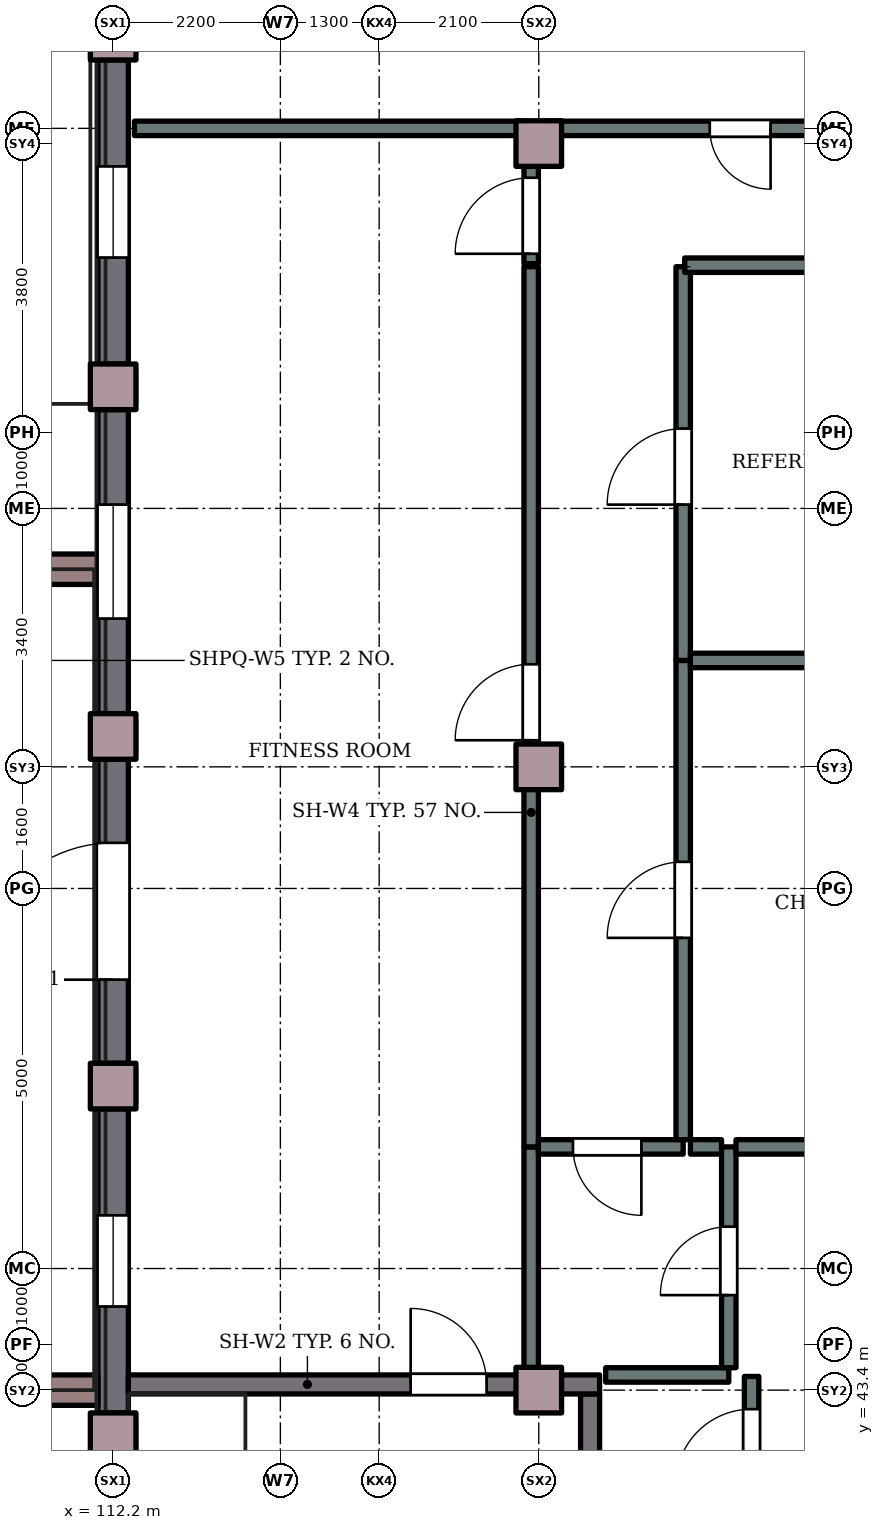
"""IFC4 building model, lengths in metres.
Left out: names, types, materials, properties, quantities, classifications, styles, units other than length and angle.
Written with IfcOpenShell. Run it as: python <this file> out.ifc"""

import sys

from ifc_helpers import new_model, si_unit, direction, frame, frame_2d, origin, origin_2d, place, context, subcontext, project, spatial, rectangle, extrude, element, fill, save


model = new_model("IFC4")
c1 = context("Model", 3, precision=1e-05, world=origin(), true_north=direction((0.0, 1.0)))
c2 = subcontext(c1, "Body", "Model", "MODEL_VIEW")
j1 = project(units=[si_unit("LENGTHUNIT", "METRE"), si_unit("PLANEANGLEUNIT", "RADIAN")], contexts=[c1])
p1 = place(None, origin())
s1 = spatial("IfcSite", under=j1, at=p1, CompositionType="ELEMENT")
p2 = place(p1, origin())
s2 = spatial("IfcBuilding", under=s1, at=p2, CompositionType="ELEMENT")
p3 = place(p2, origin())
s3 = spatial("IfcBuildingStorey", under=s2, at=p3, CompositionType="ELEMENT", Elevation=0.0)
for number, where, z_axis, x_axis in (
    (1, (112.2, 42.8, 0.0), (0.0, 0.0, 1.0), (1.0, 0.0, 0.0)),
    (2, (112.2, 47.4, 0.0), (0.0, 0.0, 1.0), (1.0, 0.0, 0.0)),
    (3, (112.2, 52.0, 0.0), (0.0, 0.0, 1.0), (1.0, 0.0, 0.0)),
    (4, (112.2, 56.6, 0.0), (0.0, 0.0, 1.0), (1.0, 0.0, 0.0)),
    (5, (112.2, 61.2, 0.0), (0.0, 0.0, 1.0), (1.0, 0.0, 0.0)),
    (6, (117.8, 51.6, 0.0), (0.0, 0.0, 1.0), (1.0, 0.0, 0.0)),
    (7, (117.8, 59.8, 0.0), (0.0, 0.0, 1.0), (1.0, 0.0, 0.0)),
    (8, (117.8, 43.4, 0.0), (0.0, 0.0, 1.0), (1.0, 0.0, 0.0)),
):
    element("IfcColumn", number, at=place(p3, frame(where, z_axis=z_axis, x_axis=x_axis)), inside=s3, PredefinedType="COLUMN", context=c2, shape_type="SweptSolid", body=[
        extrude(rectangle(XDim=0.6, YDim=0.6, at=origin_2d()), origin(), (0.0, 0.0, 1.0), 4.2),
    ])
p4 = place(p3, frame((112.2, 43.1, 0.0), z_axis=(0.0, 0.0, 1.0), x_axis=(0.0, 1.0, 0.0)))
e9 = element("IfcWall", 9, at=p4, inside=s3, PredefinedType="SOLIDWALL", context=c2, shape_type="SweptSolid", body=[
    extrude(rectangle(XDim=4.0, YDim=0.4, at=frame_2d((2.0, 0.0))), origin(), (0.0, 0.0, 1.0), 4.2),
])
p5 = place(p4, frame((1.4, 0.0, 1.2)))
e10 = element("IfcOpeningElement", 10, at=p5, cuts=e9, PredefinedType="OPENING", context=c2, shape_type="SweptSolid", body=[
    extrude(rectangle(XDim=1.2, YDim=1.8, at=frame_2d((0.6, 0.9))), frame((0.0, 0.21, 0.0), z_axis=(0.0, -1.0, 0.0), x_axis=(1.0, 0.0, 0.0)), (0.0, 0.0, 1.0), 0.42),
])
p6 = place(p3, frame((112.2, 47.7, 0.0), z_axis=(0.0, 0.0, 1.0), x_axis=(0.0, 1.0, 0.0)))
e11 = element("IfcWall", 11, at=p6, inside=s3, PredefinedType="SOLIDWALL", context=c2, shape_type="SweptSolid", body=[
    extrude(rectangle(XDim=4.0, YDim=0.4, at=frame_2d((2.0, 0.0))), origin(), (0.0, 0.0, 1.0), 4.2),
])
p7 = place(p6, frame((1.1, 0.0, 0.0)))
e12 = element("IfcOpeningElement", 12, at=p7, cuts=e11, PredefinedType="OPENING", context=c2, shape_type="SweptSolid", body=[
    extrude(rectangle(XDim=1.8, YDim=2.1, at=frame_2d((0.9, 1.05))), frame((0.0, 0.21, 0.0), z_axis=(0.0, -1.0, 0.0), x_axis=(1.0, 0.0, 0.0)), (0.0, 0.0, 1.0), 0.42),
])
p8 = place(p3, frame((112.2, 52.3, 0.0), z_axis=(0.0, 0.0, 1.0), x_axis=(0.0, 1.0, 0.0)))
e13 = element("IfcWall", 13, at=p8, inside=s3, PredefinedType="SOLIDWALL", context=c2, shape_type="SweptSolid", body=[
    extrude(rectangle(XDim=4.0, YDim=0.4, at=frame_2d((2.0, 0.0))), origin(), (0.0, 0.0, 1.0), 4.2),
])
p9 = place(p8, frame((1.25, 0.0, 0.9)))
e14 = element("IfcOpeningElement", 14, at=p9, cuts=e13, PredefinedType="OPENING", context=c2, shape_type="SweptSolid", body=[
    extrude(rectangle(XDim=1.5, YDim=2.0, at=frame_2d((0.75, 1.0))), frame((0.0, 0.21, 0.0), z_axis=(0.0, -1.0, 0.0), x_axis=(1.0, 0.0, 0.0)), (0.0, 0.0, 1.0), 0.42),
])
p10 = place(p3, frame((112.2, 56.9, 0.0), z_axis=(0.0, 0.0, 1.0), x_axis=(0.0, 1.0, 0.0)))
e15 = element("IfcWall", 15, at=p10, inside=s3, PredefinedType="SOLIDWALL", context=c2, shape_type="SweptSolid", body=[
    extrude(rectangle(XDim=4.0, YDim=0.4, at=frame_2d((2.0, 0.0))), origin(), (0.0, 0.0, 1.0), 4.2),
])
p11 = place(p10, frame((1.4, 0.0, 1.2)))
e16 = element("IfcOpeningElement", 16, at=p11, cuts=e15, PredefinedType="OPENING", context=c2, shape_type="SweptSolid", body=[
    extrude(rectangle(XDim=1.2, YDim=1.8, at=frame_2d((0.6, 0.9))), frame((0.0, 0.21, 0.0), z_axis=(0.0, -1.0, 0.0), x_axis=(1.0, 0.0, 0.0)), (0.0, 0.0, 1.0), 0.42),
])
p12 = place(p3, frame((118.475, 38.4, 0.0), z_axis=(0.0, 0.0, 1.0), x_axis=(0.0, 1.0, 0.0)))
e17 = element("IfcWall", 17, at=p12, inside=s3, PredefinedType="SHEAR", context=c2, shape_type="SweptSolid", body=[
    extrude(rectangle(XDim=4.95, YDim=0.25, at=frame_2d((2.475, 0.0))), origin(), (0.0, 0.0, 1.0), 4.2),
])
p13 = place(p3, frame((112.4, 43.475, 0.0), z_axis=(0.0, 0.0, 1.0), x_axis=(1.0, 0.0, 0.0)))
e18 = element("IfcWall", 18, at=p13, inside=s3, PredefinedType="SHEAR", context=c2, shape_type="SweptSolid", body=[
    extrude(rectangle(XDim=6.2, YDim=0.25, at=frame_2d((3.1, 0.0))), origin(), (0.0, 0.0, 1.0), 4.2),
])
p14 = place(p13, frame((3.714, 0.0, 0.0)))
e19 = element("IfcOpeningElement", 19, at=p14, cuts=e18, PredefinedType="OPENING", context=c2, shape_type="SweptSolid", body=[
    extrude(rectangle(XDim=1.0, YDim=2.1, at=frame_2d((0.5, 1.05))), frame((0.0, 0.135, 0.0), z_axis=(0.0, -1.0, 0.0), x_axis=(1.0, 0.0, 0.0)), (0.0, 0.0, 1.0), 0.27),
])
for number, where, z_axis, x_axis in (
    (20, (110.3, 43.4, 0.0), (0.0, 0.0, 1.0), (1.0, 0.0, 0.0)),
    (21, (110.3, 54.2, 0.0), (0.0, 0.0, 1.0), (1.0, 0.0, 0.0)),
):
    element("IfcWall", number, at=place(p3, frame(where, z_axis=z_axis, x_axis=x_axis)), inside=s3, PredefinedType="STANDARD", context=c2, shape_type="SweptSolid", body=[
        extrude(rectangle(XDim=1.7, YDim=0.4, at=frame_2d((0.85, 0.0))), origin(), (0.0, 0.0, 1.0), 4.2),
    ])
p15 = place(p3, frame((112.4, 43.02, 0.0), z_axis=(0.0, 0.0, 1.0), x_axis=(0.0, -1.0, 0.0)))
e22 = element("IfcWall", 22, at=p15, inside=s3, PredefinedType="PARTITIONING", context=c2, shape_type="SweptSolid", body=[
    extrude(rectangle(XDim=0.44, YDim=0.19, at=frame_2d((0.22, 0.0))), origin(), (0.0, 0.0, 1.0), 3.9),
])
p16 = place(p3, frame((112.4, 47.62, 0.0), z_axis=(0.0, 0.0, 1.0), x_axis=(0.0, -1.0, 0.0)))
e23 = element("IfcWall", 23, at=p16, inside=s3, PredefinedType="PARTITIONING", context=c2, shape_type="SweptSolid", body=[
    extrude(rectangle(XDim=0.44, YDim=0.19, at=frame_2d((0.22, 0.0))), origin(), (0.0, 0.0, 1.0), 3.9),
])
p17 = place(p3, frame((112.4, 52.22, 0.0), z_axis=(0.0, 0.0, 1.0), x_axis=(0.0, -1.0, 0.0)))
e24 = element("IfcWall", 24, at=p17, inside=s3, PredefinedType="PARTITIONING", context=c2, shape_type="SweptSolid", body=[
    extrude(rectangle(XDim=0.44, YDim=0.19, at=frame_2d((0.22, 0.0))), origin(), (0.0, 0.0, 1.0), 3.9),
])
p18 = place(p3, frame((112.4, 56.82, 0.0), z_axis=(0.0, 0.0, 1.0), x_axis=(0.0, -1.0, 0.0)))
e25 = element("IfcWall", 25, at=p18, inside=s3, PredefinedType="PARTITIONING", context=c2, shape_type="SweptSolid", body=[
    extrude(rectangle(XDim=0.44, YDim=0.19, at=frame_2d((0.22, 0.0))), origin(), (0.0, 0.0, 1.0), 3.9),
])
p19 = place(p3, frame((112.4, 61.42, 0.0), z_axis=(0.0, 0.0, 1.0), x_axis=(0.0, -1.0, 0.0)))
e26 = element("IfcWall", 26, at=p19, inside=s3, PredefinedType="PARTITIONING", context=c2, shape_type="SweptSolid", body=[
    extrude(rectangle(XDim=0.44, YDim=0.19, at=frame_2d((0.22, 0.0))), origin(), (0.0, 0.0, 1.0), 3.9),
])
p20 = place(p3, frame((117.605, 60.0, 0.0), z_axis=(0.0, 0.0, 1.0), x_axis=(-1.0, 0.0, 0.0)))
e27 = element("IfcWall", 27, at=p20, inside=s3, PredefinedType="PARTITIONING", context=c2, shape_type="SweptSolid", body=[
    extrude(rectangle(XDim=5.125, YDim=0.19, at=frame_2d((2.562, 0.0))), origin(), (0.0, 0.0, 1.0), 3.9),
])
p21 = place(p3, frame((117.7, 43.68, 0.0), z_axis=(0.0, 0.0, 1.0), x_axis=(0.0, 1.0, 0.0)))
e28 = element("IfcWall", 28, at=p21, inside=s3, PredefinedType="PARTITIONING", context=c2, shape_type="SweptSolid", body=[
    extrude(rectangle(XDim=2.92, YDim=0.19, at=frame_2d((1.46, 0.0))), origin(), (0.0, 0.0, 1.0), 3.9),
])
p22 = place(p3, frame((117.7, 46.6, 0.0), z_axis=(0.0, 0.0, 1.0), x_axis=(0.0, 1.0, 0.0)))
e29 = element("IfcWall", 29, at=p22, inside=s3, PredefinedType="PARTITIONING", context=c2, shape_type="SweptSolid", body=[
    extrude(rectangle(XDim=11.58, YDim=0.19, at=frame_2d((5.79, 0.0))), origin(), (0.0, 0.0, 1.0), 3.9),
])
p23 = place(p22, frame((5.35, 0.0, 0.0)))
e30 = element("IfcOpeningElement", 30, at=p23, cuts=e29, PredefinedType="OPENING", context=c2, shape_type="SweptSolid", body=[
    extrude(rectangle(XDim=1.0, YDim=2.1, at=frame_2d((0.5, 1.05))), frame((0.0, 0.105, 0.0), z_axis=(0.0, -1.0, 0.0), x_axis=(1.0, 0.0, 0.0)), (0.0, 0.0, 1.0), 0.21),
])
p24 = place(p3, frame((117.7, 58.22, 0.0), z_axis=(0.0, 0.0, 1.0), x_axis=(0.0, 1.0, 0.0)))
e31 = element("IfcWall", 31, at=p24, inside=s3, PredefinedType="PARTITIONING", context=c2, shape_type="SweptSolid", body=[
    extrude(rectangle(XDim=1.78, YDim=0.19, at=frame_2d((0.89, 0.0))), origin(), (0.0, 0.0, 1.0), 3.9),
])
p25 = place(p24, frame((0.13, 0.0, 0.0)))
e32 = element("IfcOpeningElement", 32, at=p25, cuts=e31, PredefinedType="OPENING", context=c2, shape_type="SweptSolid", body=[
    extrude(rectangle(XDim=1.0, YDim=2.1, at=frame_2d((0.5, 1.05))), frame((0.0, 0.105, 0.0), z_axis=(0.0, -1.0, 0.0), x_axis=(1.0, 0.0, 0.0)), (0.0, 0.0, 1.0), 0.21),
])
p26 = place(p3, frame((119.7, 46.6, 0.0), z_axis=(0.0, 0.0, 1.0), x_axis=(-1.0, 0.0, 0.0)))
e33 = element("IfcWall", 33, at=p26, inside=s3, PredefinedType="PARTITIONING", context=c2, shape_type="SweptSolid", body=[
    extrude(rectangle(XDim=1.905, YDim=0.19, at=frame_2d((0.953, 0.0))), origin(), (0.0, 0.0, 1.0), 3.9),
])
p27 = place(p26, frame((0.55, 0.0, 0.0)))
e34 = element("IfcOpeningElement", 34, at=p27, cuts=e33, PredefinedType="OPENING", context=c2, shape_type="SweptSolid", body=[
    extrude(rectangle(XDim=0.9, YDim=2.1, at=frame_2d((0.45, 1.05))), frame((0.0, 0.105, 0.0), z_axis=(0.0, -1.0, 0.0), x_axis=(1.0, 0.0, 0.0)), (0.0, 0.0, 1.0), 0.21),
])
p28 = place(p3, frame((119.7, 46.695, 0.0), z_axis=(0.0, 0.0, 1.0), x_axis=(0.0, 1.0, 0.0)))
e35 = element("IfcWall", 35, at=p28, inside=s3, PredefinedType="PARTITIONING", context=c2, shape_type="SweptSolid", body=[
    extrude(rectangle(XDim=6.305, YDim=0.19, at=frame_2d((3.152, 0.0))), origin(), (0.0, 0.0, 1.0), 3.9),
])
p29 = place(p28, frame((2.655, 0.0, 0.0)))
e36 = element("IfcOpeningElement", 36, at=p29, cuts=e35, PredefinedType="OPENING", context=c2, shape_type="SweptSolid", body=[
    extrude(rectangle(XDim=1.0, YDim=2.1, at=frame_2d((0.5, 1.05))), frame((0.0, 0.105, 0.0), z_axis=(0.0, -1.0, 0.0), x_axis=(1.0, 0.0, 0.0)), (0.0, 0.0, 1.0), 0.21),
])
p30 = place(p3, frame((119.7, 53.0, 0.0), z_axis=(0.0, 0.0, 1.0), x_axis=(0.0, 1.0, 0.0)))
e37 = element("IfcWall", 37, at=p30, inside=s3, PredefinedType="PARTITIONING", context=c2, shape_type="SweptSolid", body=[
    extrude(rectangle(XDim=5.18, YDim=0.19, at=frame_2d((2.59, 0.0))), origin(), (0.0, 0.0, 1.0), 3.9),
])
p31 = place(p30, frame((2.05, 0.0, 0.0)))
e38 = element("IfcOpeningElement", 38, at=p31, cuts=e37, PredefinedType="OPENING", context=c2, shape_type="SweptSolid", body=[
    extrude(rectangle(XDim=1.0, YDim=2.1, at=frame_2d((0.5, 1.05))), frame((0.0, 0.105, 0.0), z_axis=(0.0, -1.0, 0.0), x_axis=(1.0, 0.0, 0.0)), (0.0, 0.0, 1.0), 0.21),
])
p32 = place(p3, frame((120.205, 46.6, 0.0), z_axis=(0.0, 0.0, 1.0), x_axis=(-1.0, 0.0, 0.0)))
e39 = element("IfcWall", 39, at=p32, inside=s3, PredefinedType="PARTITIONING", context=c2, shape_type="SweptSolid", body=[
    extrude(rectangle(XDim=0.41, YDim=0.19, at=frame_2d((0.205, 0.0))), origin(), (0.0, 0.0, 1.0), 3.9),
])
p33 = place(p3, frame((120.3, 43.6, 0.0), z_axis=(0.0, 0.0, 1.0), x_axis=(-1.0, 0.0, 0.0)))
e40 = element("IfcWall", 40, at=p33, inside=s3, PredefinedType="PARTITIONING", context=c2, shape_type="SweptSolid", body=[
    extrude(rectangle(XDim=1.62, YDim=0.19, at=frame_2d((0.81, 0.0))), origin(), (0.0, 0.0, 1.0), 3.9),
])
p34 = place(p3, frame((120.3, 43.695, 0.0), z_axis=(0.0, 0.0, 1.0), x_axis=(0.0, 1.0, 0.0)))
e41 = element("IfcWall", 41, at=p34, inside=s3, PredefinedType="PARTITIONING", context=c2, shape_type="SweptSolid", body=[
    extrude(rectangle(XDim=2.905, YDim=0.19, at=frame_2d((1.453, 0.0))), origin(), (0.0, 0.0, 1.0), 3.9),
])
p35 = place(p34, frame((0.955, 0.0, 0.0)))
e42 = element("IfcOpeningElement", 42, at=p35, cuts=e41, PredefinedType="OPENING", context=c2, shape_type="SweptSolid", body=[
    extrude(rectangle(XDim=0.9, YDim=2.1, at=frame_2d((0.45, 1.05))), frame((0.0, 0.105, 0.0), z_axis=(0.0, -1.0, 0.0), x_axis=(1.0, 0.0, 0.0)), (0.0, 0.0, 1.0), 0.21),
])
p36 = place(p3, frame((120.6, 41.68, 0.0), z_axis=(0.0, 0.0, 1.0), x_axis=(0.0, 1.0, 0.0)))
e43 = element("IfcWall", 43, at=p36, inside=s3, PredefinedType="PARTITIONING", context=c2, shape_type="SweptSolid", body=[
    extrude(rectangle(XDim=1.9, YDim=0.19, at=frame_2d((0.95, 0.0))), origin(), (0.0, 0.0, 1.0), 3.9),
])
p37 = place(p36, frame((0.47, 0.0, 0.0)))
e44 = element("IfcOpeningElement", 44, at=p37, cuts=e43, PredefinedType="OPENING", context=c2, shape_type="SweptSolid", body=[
    extrude(rectangle(XDim=1.0, YDim=2.1, at=frame_2d((0.5, 1.05))), frame((0.0, 0.105, 0.0), z_axis=(0.0, -1.0, 0.0), x_axis=(1.0, 0.0, 0.0)), (0.0, 0.0, 1.0), 0.21),
])
p38 = place(p3, frame((123.2, 60.0, 0.0), z_axis=(0.0, 0.0, 1.0), x_axis=(-1.0, 0.0, 0.0)))
e45 = element("IfcWall", 45, at=p38, inside=s3, PredefinedType="PARTITIONING", context=c2, shape_type="SweptSolid", body=[
    extrude(rectangle(XDim=5.405, YDim=0.19, at=frame_2d((2.703, 0.0))), origin(), (0.0, 0.0, 1.0), 3.9),
])
p39 = place(p38, frame((2.35, 0.0, 0.0)))
e46 = element("IfcOpeningElement", 46, at=p39, cuts=e45, PredefinedType="OPENING", context=c2, shape_type="SweptSolid", body=[
    extrude(rectangle(XDim=0.8, YDim=2.1, at=frame_2d((0.4, 1.05))), frame((0.0, 0.105, 0.0), z_axis=(0.0, -1.0, 0.0), x_axis=(1.0, 0.0, 0.0)), (0.0, 0.0, 1.0), 0.21),
])
p40 = place(p3, frame((124.755, 53.0, 0.0), z_axis=(0.0, 0.0, 1.0), x_axis=(-1.0, 0.0, 0.0)))
e47 = element("IfcWall", 47, at=p40, inside=s3, PredefinedType="PARTITIONING", context=c2, shape_type="SweptSolid", body=[
    extrude(rectangle(XDim=4.96, YDim=0.19, at=frame_2d((2.48, 0.0))), origin(), (0.0, 0.0, 1.0), 3.9),
])
p41 = place(p3, frame((124.755, 58.2, 0.0), z_axis=(0.0, 0.0, 1.0), x_axis=(-1.0, 0.0, 0.0)))
e48 = element("IfcWall", 48, at=p41, inside=s3, PredefinedType="PARTITIONING", context=c2, shape_type="SweptSolid", body=[
    extrude(rectangle(XDim=5.035, YDim=0.19, at=frame_2d((2.518, 0.0))), origin(), (0.0, 0.0, 1.0), 3.9),
])
p42 = place(p41, frame((1.955, 0.0, 0.0)))
e49 = element("IfcOpeningElement", 49, at=p42, cuts=e48, PredefinedType="OPENING", context=c2, shape_type="SweptSolid", body=[
    extrude(rectangle(XDim=1.0, YDim=2.1, at=frame_2d((0.5, 1.05))), frame((0.0, 0.105, 0.0), z_axis=(0.0, -1.0, 0.0), x_axis=(1.0, 0.0, 0.0)), (0.0, 0.0, 1.0), 0.21),
])
p43 = place(p3, frame((124.85, 46.6, 0.0), z_axis=(0.0, 0.0, 1.0), x_axis=(-1.0, 0.0, 0.0)))
e50 = element("IfcWall", 50, at=p43, inside=s3, PredefinedType="PARTITIONING", context=c2, shape_type="SweptSolid", body=[
    extrude(rectangle(XDim=4.455, YDim=0.19, at=frame_2d((2.228, 0.0))), origin(), (0.0, 0.0, 1.0), 3.9),
])
p44 = place(p43, frame((1.8, 0.0, 0.0)))
e51 = element("IfcOpeningElement", 51, at=p44, cuts=e50, PredefinedType="OPENING", context=c2, shape_type="SweptSolid", body=[
    extrude(rectangle(XDim=1.0, YDim=2.1, at=frame_2d((0.5, 1.05))), frame((0.0, 0.105, 0.0), z_axis=(0.0, -1.0, 0.0), x_axis=(1.0, 0.0, 0.0)), (0.0, 0.0, 1.0), 0.21),
])
p45 = place(p7, origin())
e52 = element("IfcDoor", 52, at=p45, inside=s3, OperationType="DOUBLE_DOOR_SINGLE_SWING", PredefinedType="DOOR", context=c2, shape_type="SweptSolid", body=[
    extrude(rectangle(XDim=1.8, YDim=2.1, at=frame_2d((0.9, 1.05))), frame((0.0, 0.025, 0.0), z_axis=(0.0, -1.0, 0.0), x_axis=(1.0, 0.0, 0.0)), (0.0, 0.0, 1.0), 0.05),
])
fill(e12, e52)
p46 = place(p5, origin())
e53 = element("IfcWindow", 53, at=p46, inside=s3, PartitioningType="SINGLE_PANEL", PredefinedType="WINDOW", context=c2, shape_type="SweptSolid", body=[
    extrude(rectangle(XDim=1.2, YDim=1.8, at=frame_2d((0.6, 0.9))), frame((0.0, 0.03, 0.0), z_axis=(0.0, -1.0, 0.0), x_axis=(1.0, 0.0, 0.0)), (0.0, 0.0, 1.0), 0.06),
])
fill(e10, e53)
p47 = place(p9, origin())
e54 = element("IfcWindow", 54, at=p47, inside=s3, PartitioningType="SINGLE_PANEL", PredefinedType="WINDOW", context=c2, shape_type="SweptSolid", body=[
    extrude(rectangle(XDim=1.5, YDim=2.0, at=frame_2d((0.75, 1.0))), frame((0.0, 0.03, 0.0), z_axis=(0.0, -1.0, 0.0), x_axis=(1.0, 0.0, 0.0)), (0.0, 0.0, 1.0), 0.06),
])
fill(e14, e54)
p48 = place(p11, origin())
e55 = element("IfcWindow", 55, at=p48, inside=s3, PartitioningType="SINGLE_PANEL", PredefinedType="WINDOW", context=c2, shape_type="SweptSolid", body=[
    extrude(rectangle(XDim=1.2, YDim=1.8, at=frame_2d((0.6, 0.9))), frame((0.0, 0.03, 0.0), z_axis=(0.0, -1.0, 0.0), x_axis=(1.0, 0.0, 0.0)), (0.0, 0.0, 1.0), 0.06),
])
fill(e16, e55)
p49 = place(p37, origin())
e56 = element("IfcDoor", 56, at=p49, inside=s3, OperationType="SINGLE_SWING_LEFT", PredefinedType="DOOR", context=c2, shape_type="SweptSolid", body=[
    extrude(rectangle(XDim=1.0, YDim=2.1, at=frame_2d((0.5, 1.05))), frame((0.0, 0.025, 0.0), z_axis=(0.0, -1.0, 0.0), x_axis=(1.0, 0.0, 0.0)), (0.0, 0.0, 1.0), 0.05),
])
fill(e44, e56)
p50 = place(p14, origin())
e57 = element("IfcDoor", 57, at=p50, inside=s3, OperationType="SINGLE_SWING_LEFT", PredefinedType="DOOR", context=c2, shape_type="SweptSolid", body=[
    extrude(rectangle(XDim=1.0, YDim=2.1, at=frame_2d((0.5, 1.05))), frame((0.0, 0.025, 0.0), z_axis=(0.0, -1.0, 0.0), x_axis=(1.0, 0.0, 0.0)), (0.0, 0.0, 1.0), 0.05),
])
fill(e19, e57)
p51 = place(p23, origin())
e58 = element("IfcDoor", 58, at=p51, inside=s3, OperationType="SINGLE_SWING_LEFT", PredefinedType="DOOR", context=c2, shape_type="SweptSolid", body=[
    extrude(rectangle(XDim=1.0, YDim=2.1, at=frame_2d((0.5, 1.05))), frame((0.0, 0.025, 0.0), z_axis=(0.0, -1.0, 0.0), x_axis=(1.0, 0.0, 0.0)), (0.0, 0.0, 1.0), 0.05),
])
fill(e30, e58)
p52 = place(p25, origin())
e59 = element("IfcDoor", 59, at=p52, inside=s3, OperationType="SINGLE_SWING_LEFT", PredefinedType="DOOR", context=c2, shape_type="SweptSolid", body=[
    extrude(rectangle(XDim=1.0, YDim=2.1, at=frame_2d((0.5, 1.05))), frame((0.0, 0.025, 0.0), z_axis=(0.0, -1.0, 0.0), x_axis=(1.0, 0.0, 0.0)), (0.0, 0.0, 1.0), 0.05),
])
fill(e32, e59)
p53 = place(p35, origin())
e60 = element("IfcDoor", 60, at=p53, inside=s3, OperationType="SINGLE_SWING_LEFT", PredefinedType="DOOR", context=c2, shape_type="SweptSolid", body=[
    extrude(rectangle(XDim=0.9, YDim=2.1, at=frame_2d((0.45, 1.05))), frame((0.0, 0.025, 0.0), z_axis=(0.0, -1.0, 0.0), x_axis=(1.0, 0.0, 0.0)), (0.0, 0.0, 1.0), 0.05),
])
fill(e42, e60)
p54 = place(p27, origin())
e61 = element("IfcDoor", 61, at=p54, inside=s3, OperationType="SINGLE_SWING_LEFT", PredefinedType="DOOR", context=c2, shape_type="SweptSolid", body=[
    extrude(rectangle(XDim=0.9, YDim=2.1, at=frame_2d((0.45, 1.05))), frame((0.0, 0.025, 0.0), z_axis=(0.0, -1.0, 0.0), x_axis=(1.0, 0.0, 0.0)), (0.0, 0.0, 1.0), 0.05),
])
fill(e34, e61)
p55 = place(p29, origin())
e62 = element("IfcDoor", 62, at=p55, inside=s3, OperationType="SINGLE_SWING_LEFT", PredefinedType="DOOR", context=c2, shape_type="SweptSolid", body=[
    extrude(rectangle(XDim=1.0, YDim=2.1, at=frame_2d((0.5, 1.05))), frame((0.0, 0.025, 0.0), z_axis=(0.0, -1.0, 0.0), x_axis=(1.0, 0.0, 0.0)), (0.0, 0.0, 1.0), 0.05),
])
fill(e36, e62)
p56 = place(p31, origin())
e63 = element("IfcDoor", 63, at=p56, inside=s3, OperationType="SINGLE_SWING_LEFT", PredefinedType="DOOR", context=c2, shape_type="SweptSolid", body=[
    extrude(rectangle(XDim=1.0, YDim=2.1, at=frame_2d((0.5, 1.05))), frame((0.0, 0.025, 0.0), z_axis=(0.0, -1.0, 0.0), x_axis=(1.0, 0.0, 0.0)), (0.0, 0.0, 1.0), 0.05),
])
fill(e38, e63)
p57 = place(p39, origin())
e64 = element("IfcDoor", 64, at=p57, inside=s3, OperationType="SINGLE_SWING_LEFT", PredefinedType="DOOR", context=c2, shape_type="SweptSolid", body=[
    extrude(rectangle(XDim=0.8, YDim=2.1, at=frame_2d((0.4, 1.05))), frame((0.0, 0.025, 0.0), z_axis=(0.0, -1.0, 0.0), x_axis=(1.0, 0.0, 0.0)), (0.0, 0.0, 1.0), 0.05),
])
fill(e46, e64)
save(model, sys.argv[1])
